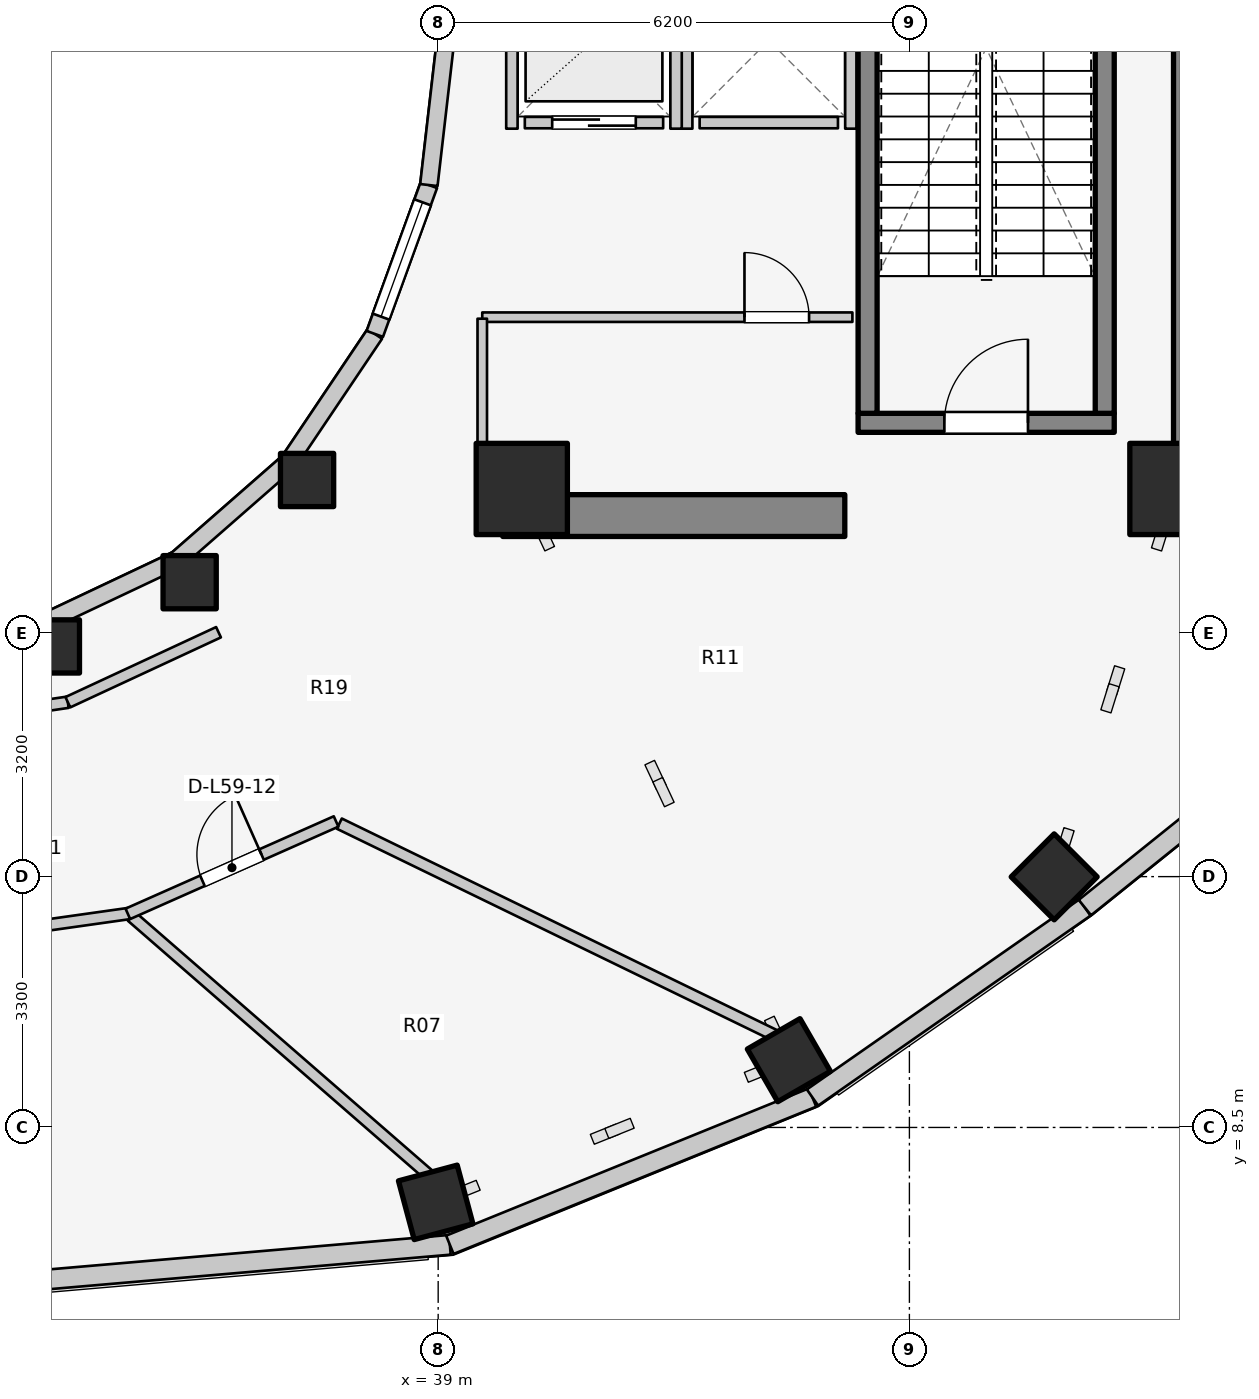
"""IFC4 building model, lengths in metres.
Left out: names, types, materials, properties, quantities, classifications, styles, units other than length and angle.
Written with IfcOpenShell. Run it as: python <this file> out.ifc"""

import sys

from ifc_helpers import new_model, si_unit, direction, frame, frame_2d, origin, origin_2d, place, context, subcontext, project, spatial, rectangle, extrude, element, fill, save


model = new_model("IFC4")
c1 = context("Model", 3, precision=1e-05, world=origin(), true_north=direction((0.0, 1.0)))
c2 = subcontext(c1, "Body", "Model", "MODEL_VIEW")
j1 = project(units=[si_unit("LENGTHUNIT", "METRE"), si_unit("PLANEANGLEUNIT", "RADIAN")], contexts=[c1])
p1 = place(None, origin())
s1 = spatial("IfcSite", under=j1, at=p1, CompositionType="ELEMENT")
p2 = place(p1, origin())
s2 = spatial("IfcBuilding", under=s1, at=p2, CompositionType="ELEMENT")
p3 = place(p2, frame((0.0, 0.0, 193.2)))
s3 = spatial("IfcBuildingStorey", under=s2, at=p3, CompositionType="ELEMENT", Elevation=193.2)
p4 = place(p3, frame((48.95, 17.05, 0.0), z_axis=(0.0, 0.0, 1.0), x_axis=(0.0, 1.0, 0.0)))
e1 = element("IfcWall", 1, at=p4, inside=s3, PredefinedType="SHEAR", context=c2, shape_type="SweptSolid", body=[
    extrude(rectangle(XDim=12.8, YDim=0.55, at=frame_2d((6.4, 0.0))), origin(), (0.0, 0.0, 1.0), 4.2),
])
p5 = place(p3, frame((39.85, 16.55, 0.0), z_axis=(0.0, 0.0, 1.0), x_axis=(1.0, 0.0, 0.0)))
e2 = element("IfcWall", 2, at=p5, inside=s3, PredefinedType="SHEAR", context=c2, shape_type="SweptSolid", body=[
    extrude(rectangle(XDim=4.5, YDim=0.55, at=frame_2d((2.25, 0.0))), origin(), (0.0, 0.0, 1.0), 4.2),
])
p6 = place(p3, frame((44.525, 17.77, 0.0), z_axis=(0.0, 0.0, 1.0), x_axis=(1.0, 0.0, 0.0)))
e3 = element("IfcWall", 3, at=p6, inside=s3, PredefinedType="SOLIDWALL", context=c2, shape_type="SweptSolid", body=[
    extrude(rectangle(XDim=3.37, YDim=0.25, at=frame_2d((1.685, 0.0))), origin(), (0.0, 0.0, 1.0), 4.2),
])
p7 = place(p6, frame((1.135, 0.0, 0.0)))
e4 = element("IfcOpeningElement", 4, at=p7, cuts=e3, PredefinedType="OPENING", context=c2, shape_type="SweptSolid", body=[
    extrude(rectangle(XDim=1.1, YDim=2.1, at=frame_2d((0.55, 1.05))), frame((0.0, 0.135, 0.0), z_axis=(0.0, -1.0, 0.0), x_axis=(1.0, 0.0, 0.0)), (0.0, 0.0, 1.0), 0.27),
])
for number, where, z_axis, x_axis in (
    (5, (44.65, 17.895, 0.0), (0.0, 0.0, 1.0), (0.0, 1.0, 0.0)),
    (6, (47.77, 17.895, 0.0), (0.0, 0.0, 1.0), (0.0, 1.0, 0.0)),
):
    element("IfcWall", number, at=place(p3, frame(where, z_axis=z_axis, x_axis=x_axis)), inside=s3, PredefinedType="SOLIDWALL", context=c2, shape_type="SweptSolid", body=[
        extrude(rectangle(XDim=7.81, YDim=0.25, at=frame_2d((3.905, 0.0))), origin(), (0.0, 0.0, 1.0), 4.2),
    ])
for number, where, z_axis, x_axis in (
    (7, (40.1, 16.9, 0.0), (0.0, 0.0, 1.0), (1.0, 0.0, 0.0)),
    (8, (48.7, 16.9, 0.0), (0.0, 0.0, 1.0), (1.0, 0.0, 0.0)),
):
    element("IfcColumn", number, at=place(p3, frame(where, z_axis=z_axis, x_axis=x_axis)), inside=s3, PredefinedType="COLUMN", context=c2, shape_type="SweptSolid", body=[
        extrude(rectangle(XDim=1.2, YDim=1.2, at=origin_2d()), origin(), (0.0, 0.0, 1.0), 4.2),
    ])
p8 = place(p3, frame((33.931, 14.828, 0.0), z_axis=(0.0, 0.0, 1.0), x_axis=(1.0, 0.0, 0.0)))
e9 = element("IfcColumn", 9, at=p8, inside=s3, PredefinedType="COLUMN", context=c2, shape_type="SweptSolid", body=[
    extrude(rectangle(XDim=0.7, YDim=0.7, at=origin_2d()), origin(), (0.0, 0.0, 1.0), 4.2),
])
p9 = place(p3, frame((38.967, 7.515, 0.0), z_axis=(0.0, 0.0, 1.0), x_axis=(0.258819045103, -0.965925826289, 0.0)))
e10 = element("IfcColumn", 10, at=p9, inside=s3, PredefinedType="COLUMN", context=c2, shape_type="SweptSolid", body=[
    extrude(rectangle(XDim=0.8, YDim=0.8, at=origin_2d()), origin(), (0.0, 0.0, 1.0), 4.2),
])
p10 = place(p3, frame((35.73, 15.673, 0.0), z_axis=(0.0, 0.0, 1.0), x_axis=(1.0, 0.0, 0.0)))
e11 = element("IfcColumn", 11, at=p10, inside=s3, PredefinedType="COLUMN", context=c2, shape_type="SweptSolid", body=[
    extrude(rectangle(XDim=0.7, YDim=0.7, at=origin_2d()), origin(), (0.0, 0.0, 1.0), 4.2),
])
p11 = place(p3, frame((43.614, 9.385, 0.0), z_axis=(0.0, 0.0, 1.0), x_axis=(0.5, -0.866025403784, 0.0)))
e12 = element("IfcColumn", 12, at=p11, inside=s3, PredefinedType="COLUMN", context=c2, shape_type="SweptSolid", body=[
    extrude(rectangle(XDim=0.8, YDim=0.8, at=origin_2d()), origin(), (0.0, 0.0, 1.0), 4.2),
])
p12 = place(p3, frame((37.275, 17.018, 0.0), z_axis=(0.0, 0.0, 1.0), x_axis=(1.0, 0.0, 0.0)))
e13 = element("IfcColumn", 13, at=p12, inside=s3, PredefinedType="COLUMN", context=c2, shape_type="SweptSolid", body=[
    extrude(rectangle(XDim=0.7, YDim=0.7, at=origin_2d()), origin(), (0.0, 0.0, 1.0), 4.2),
])
p13 = place(p3, frame((47.105, 11.797, 0.0), z_axis=(0.0, 0.0, 1.0), x_axis=(0.707106781187, -0.707106781187, 0.0)))
e14 = element("IfcColumn", 14, at=p13, inside=s3, PredefinedType="COLUMN", context=c2, shape_type="SweptSolid", body=[
    extrude(rectangle(XDim=0.8, YDim=0.8, at=origin_2d()), origin(), (0.0, 0.0, 1.0), 4.2),
])
p14 = place(p3, frame((33.843, 15.157, 0.0), z_axis=(0.0, 0.0, 1.0), x_axis=(0.904179699603, 0.427152280606, 0.0)))
e15 = element("IfcWall", 15, at=p14, inside=s3, PredefinedType="STANDARD", context=c2, shape_type="SweptSolid", body=[
    extrude(rectangle(XDim=1.899, YDim=0.23, at=frame_2d((0.95, 0.0))), origin(), (0.0, 0.0, 1.0), 2.32),
])
p15 = place(p3, frame((35.56, 15.968, 0.0), z_axis=(0.0, 0.0, 1.0), x_axis=(0.752576694707, 0.658504607869, 0.0)))
e16 = element("IfcWall", 16, at=p15, inside=s3, PredefinedType="STANDARD", context=c2, shape_type="SweptSolid", body=[
    extrude(rectangle(XDim=1.959, YDim=0.23, at=frame_2d((0.98, 0.0))), origin(), (0.0, 0.0, 1.0), 2.32),
])
p16 = place(p3, frame((37.035, 17.258, 0.0), z_axis=(0.0, 0.0, 1.0), x_axis=(0.558197800898, 0.829707909492, 0.0)))
e17 = element("IfcWall", 17, at=p16, inside=s3, PredefinedType="STANDARD", context=c2, shape_type="SweptSolid", body=[
    extrude(rectangle(XDim=2.027, YDim=0.23, at=frame_2d((1.013, 0.0))), origin(), (0.0, 0.0, 1.0), 2.32),
])
p17 = place(p3, frame((38.166, 18.94, 0.0), z_axis=(0.0, 0.0, 1.0), x_axis=(0.341423187295, 0.93990968033, 0.0)))
e18 = element("IfcWall", 18, at=p17, inside=s3, PredefinedType="STANDARD", context=c2, shape_type="SweptSolid", body=[
    extrude(rectangle(XDim=2.084, YDim=0.23, at=frame_2d((1.042, 0.0))), origin(), (0.0, 0.0, 1.0), 2.8),
])
p18 = place(p17, frame((0.242, 0.0, 0.85)))
e19 = element("IfcOpeningElement", 19, at=p18, cuts=e18, PredefinedType="OPENING", context=c2, shape_type="SweptSolid", body=[
    extrude(rectangle(XDim=1.6, YDim=1.65, at=frame_2d((0.8, 0.825))), frame((0.0, 0.125, 0.0), z_axis=(0.0, -1.0, 0.0), x_axis=(1.0, 0.0, 0.0)), (0.0, 0.0, 1.0), 0.25),
])
p19 = place(p3, frame((38.877, 20.898, 0.0), z_axis=(0.0, 0.0, 1.0), x_axis=(0.114711713601, 0.993398823617, 0.0)))
e20 = element("IfcWall", 20, at=p19, inside=s3, PredefinedType="STANDARD", context=c2, shape_type="SweptSolid", body=[
    extrude(rectangle(XDim=2.115, YDim=0.23, at=frame_2d((1.058, 0.0))), origin(), (0.0, 0.0, 1.0), 2.8),
])
p20 = place(p3, frame((32.0, 6.34, 0.0), z_axis=(0.0, 0.0, 1.0), x_axis=(0.996313592678, 0.085785925682, 0.0)))
e21 = element("IfcWall", 21, at=p20, inside=s3, PredefinedType="STANDARD", context=c2, shape_type="SweptSolid", body=[
    extrude(rectangle(XDim=7.18, YDim=0.26, at=frame_2d((3.59, 0.0))), origin(), (0.0, 0.0, 1.0), 2.32),
])
p21 = place(p3, frame((39.154, 6.956, 0.0), z_axis=(0.0, 0.0, 1.0), x_axis=(0.926505317676, 0.376281671514, 0.0)))
e22 = element("IfcWall", 22, at=p21, inside=s3, PredefinedType="STANDARD", context=c2, shape_type="SweptSolid", body=[
    extrude(rectangle(XDim=5.15, YDim=0.26, at=frame_2d((2.575, 0.0))), origin(), (0.0, 0.0, 1.0), 2.32),
])
p22 = place(p3, frame((43.925, 8.894, 0.0), z_axis=(0.0, 0.0, 1.0), x_axis=(0.820288529478, 0.571949935228, 0.0)))
e23 = element("IfcWall", 23, at=p22, inside=s3, PredefinedType="STANDARD", context=c2, shape_type="SweptSolid", body=[
    extrude(rectangle(XDim=4.369, YDim=0.26, at=frame_2d((2.185, 0.0))), origin(), (0.0, 0.0, 1.0), 2.32),
])
p23 = place(p3, frame((47.509, 11.393, 0.0), z_axis=(0.0, 0.0, 1.0), x_axis=(0.779582489695, 0.626299562319, 0.0)))
e24 = element("IfcWall", 24, at=p23, inside=s3, PredefinedType="STANDARD", context=c2, shape_type="SweptSolid", body=[
    extrude(rectangle(XDim=4.283, YDim=0.26, at=frame_2d((2.142, 0.0))), origin(), (0.0, 0.0, 1.0), 2.32),
])
p24 = place(p3, frame((42.44, 21.72, 0.0), z_axis=(0.0, 0.0, 1.0), x_axis=(1.0, 0.0, 0.0)))
e25 = element("IfcWall", 25, at=p24, inside=s3, PredefinedType="SOLIDWALL", context=c2, shape_type="SweptSolid", body=[
    extrude(rectangle(XDim=1.82, YDim=0.15, at=frame_2d((0.91, 0.0))), origin(), (0.0, 0.0, 1.0), 3.675),
])
for number, where, z_axis, x_axis in (
    (26, (42.27, 21.64, 0.0), (0.0, 0.0, 1.0), (0.0, 1.0, 0.0)),
    (27, (44.43, 21.64, 0.0), (0.0, 0.0, 1.0), (0.0, 1.0, 0.0)),
):
    element("IfcWall", number, at=place(p3, frame(where, z_axis=z_axis, x_axis=x_axis)), inside=s3, PredefinedType="SOLIDWALL", context=c2, shape_type="SweptSolid", body=[
        extrude(rectangle(XDim=2.32, YDim=0.15, at=frame_2d((1.16, 0.0))), origin(), (0.0, 0.0, 1.0), 3.675),
    ])
p25 = place(p3, frame((40.14, 21.72, 0.0), z_axis=(0.0, 0.0, 1.0), x_axis=(1.0, 0.0, 0.0)))
e28 = element("IfcWall", 28, at=p25, inside=s3, PredefinedType="SOLIDWALL", context=c2, shape_type="SweptSolid", body=[
    extrude(rectangle(XDim=1.82, YDim=0.15, at=frame_2d((0.91, 0.0))), origin(), (0.0, 0.0, 1.0), 3.22),
])
p26 = place(p25, frame((0.36, 0.0, 0.0)))
e29 = element("IfcOpeningElement", 29, at=p26, cuts=e28, PredefinedType="OPENING", context=c2, shape_type="SweptSolid", body=[
    extrude(rectangle(XDim=1.1, YDim=2.1, at=frame_2d((0.55, 1.05))), frame((0.0, 0.085, 0.0), z_axis=(0.0, -1.0, 0.0), x_axis=(1.0, 0.0, 0.0)), (0.0, 0.0, 1.0), 0.17),
])
p27 = place(p3, frame((39.97, 21.64, 0.0), z_axis=(0.0, 0.0, 1.0), x_axis=(0.0, 1.0, 0.0)))
e30 = element("IfcWall", 30, at=p27, inside=s3, PredefinedType="SOLIDWALL", context=c2, shape_type="SweptSolid", body=[
    extrude(rectangle(XDim=2.32, YDim=0.15, at=frame_2d((1.16, 0.0))), origin(), (0.0, 0.0, 1.0), 3.22),
])
p28 = place(p3, frame((42.13, 21.64, 0.0), z_axis=(0.0, 0.0, 1.0), x_axis=(0.0, 1.0, 0.0)))
e31 = element("IfcWall", 31, at=p28, inside=s3, PredefinedType="SOLIDWALL", context=c2, shape_type="SweptSolid", body=[
    extrude(rectangle(XDim=2.32, YDim=0.15, at=frame_2d((1.16, 0.0))), origin(), (0.0, 0.0, 1.0), 3.675),
])
p29 = place(p3, frame((39.58, 19.16, 0.0), z_axis=(0.0, 0.0, 1.0), x_axis=(1.0, 0.0, 0.0)))
e32 = element("IfcWall", 32, at=p29, inside=s3, PredefinedType="PARTITIONING", context=c2, shape_type="SweptSolid", body=[
    extrude(rectangle(XDim=4.87, YDim=0.125, at=frame_2d((2.435, 0.0))), origin(), (0.0, 0.0, 1.0), 3.22),
])
p30 = place(p29, frame((3.45, 0.0, 0.0)))
e33 = element("IfcOpeningElement", 33, at=p30, cuts=e32, PredefinedType="OPENING", context=c2, shape_type="SweptSolid", body=[
    extrude(rectangle(XDim=0.85, YDim=2.05, at=frame_2d((0.425, 1.025))), frame((0.0, 0.073, 0.0), z_axis=(0.0, -1.0, 0.0), x_axis=(1.0, 0.0, 0.0)), (0.0, 0.0, 1.0), 0.145),
])
p31 = place(p3, frame((39.58, 17.1, 0.0), z_axis=(0.0, 0.0, 1.0), x_axis=(0.0, 1.0, 0.0)))
e34 = element("IfcWall", 34, at=p31, inside=s3, PredefinedType="PARTITIONING", context=c2, shape_type="SweptSolid", body=[
    extrude(rectangle(XDim=2.04, YDim=0.125, at=frame_2d((1.02, 0.0))), origin(), (0.0, 0.0, 1.0), 3.052),
])
p32 = place(p3, frame((32.0, 13.78, 0.0), z_axis=(0.0, 0.0, 1.0), x_axis=(0.989268584896, 0.146108408166, 0.0)))
e35 = element("IfcWall", 35, at=p32, inside=s3, PredefinedType="PARTITIONING", context=c2, shape_type="SweptSolid", body=[
    extrude(rectangle(XDim=2.151, YDim=0.15, at=frame_2d((1.075, 0.0))), origin(), (0.0, 0.0, 1.0), 3.196),
])
p33 = place(p3, frame((34.127, 14.094, 0.0), z_axis=(0.0, 0.0, 1.0), x_axis=(0.906943449489, 0.421252393975, 0.0)))
e36 = element("IfcWall", 36, at=p33, inside=s3, PredefinedType="PARTITIONING", context=c2, shape_type="SweptSolid", body=[
    extrude(rectangle(XDim=2.186, YDim=0.15, at=frame_2d((1.093, 0.0))), origin(), (0.0, 0.0, 1.0), 2.32),
])
p34 = place(p3, frame((34.966, 11.276, 0.0), z_axis=(0.0, 0.0, 1.0), x_axis=(0.754512026555, -0.656286219407, 0.0)))
e37 = element("IfcWall", 37, at=p34, inside=s3, PredefinedType="PARTITIONING", context=c2, shape_type="SweptSolid", body=[
    extrude(rectangle(XDim=5.172, YDim=0.15, at=frame_2d((2.586, 0.0))), origin(), (0.0, 0.0, 1.0), 2.32),
])
p35 = place(p3, frame((37.699, 12.497, 0.0), z_axis=(0.0, 0.0, 1.0), x_axis=(0.899365131214, -0.437198308273, 0.0)))
e38 = element("IfcWall", 38, at=p35, inside=s3, PredefinedType="PARTITIONING", context=c2, shape_type="SweptSolid", body=[
    extrude(rectangle(XDim=6.365, YDim=0.15, at=frame_2d((3.183, 0.0))), origin(), (0.0, 0.0, 1.0), 2.32),
])
p36 = place(p3, frame((31.998, 10.9, 0.0), z_axis=(0.0, 0.0, 1.0), x_axis=(0.990167445312, 0.139887205436, 0.0)))
e39 = element("IfcWall", 39, at=p36, inside=s3, PredefinedType="PARTITIONING", context=c2, shape_type="SweptSolid", body=[
    extrude(rectangle(XDim=2.963, YDim=0.15, at=frame_2d((1.482, 0.0))), origin(), (0.0, 0.0, 1.0), 3.196),
])
p37 = place(p36, frame((1.057, 0.0, 0.0)))
e40 = element("IfcOpeningElement", 40, at=p37, cuts=e39, PredefinedType="OPENING", context=c2, shape_type="SweptSolid", body=[
    extrude(rectangle(XDim=0.85, YDim=2.05, at=frame_2d((0.425, 1.025))), frame((0.0, 0.085, 0.0), z_axis=(0.0, -1.0, 0.0), x_axis=(1.0, 0.0, 0.0)), (0.0, 0.0, 1.0), 0.17),
])
p38 = place(p3, frame((34.917, 11.31, 0.0), z_axis=(0.0, 0.0, 1.0), x_axis=(0.914100192658, 0.405488394141, 0.0)))
e41 = element("IfcWall", 41, at=p38, inside=s3, PredefinedType="PARTITIONING", context=c2, shape_type="SweptSolid", body=[
    extrude(rectangle(XDim=2.997, YDim=0.15, at=frame_2d((1.499, 0.0))), origin(), (0.0, 0.0, 1.0), 3.196),
])
p39 = place(p38, frame((1.073, 0.0, 0.0)))
e42 = element("IfcOpeningElement", 42, at=p39, cuts=e41, PredefinedType="OPENING", context=c2, shape_type="SweptSolid", body=[
    extrude(rectangle(XDim=0.85, YDim=2.05, at=frame_2d((0.425, 1.025))), frame((0.0, 0.085, 0.0), z_axis=(0.0, -1.0, 0.0), x_axis=(1.0, 0.0, 0.0)), (0.0, 0.0, 1.0), 0.17),
])
p40 = place(p18, origin())
e43 = element("IfcWindow", 43, at=p40, inside=s3, PartitioningType="SINGLE_PANEL", PredefinedType="WINDOW", context=c2, shape_type="SweptSolid", body=[
    extrude(rectangle(XDim=1.6, YDim=1.65, at=frame_2d((0.8, 0.825))), frame((0.0, 0.03, 0.0), z_axis=(0.0, -1.0, 0.0), x_axis=(1.0, 0.0, 0.0)), (0.0, 0.0, 1.0), 0.06),
])
fill(e19, e43)
p41 = place(p7, origin())
e44 = element("IfcDoor", 44, at=p41, inside=s3, OperationType="SINGLE_SWING_RIGHT", PredefinedType="DOOR", context=c2, shape_type="SweptSolid", body=[
    extrude(rectangle(XDim=1.1, YDim=2.1, at=frame_2d((0.55, 1.05))), frame((0.0, 0.025, 0.0), z_axis=(0.0, -1.0, 0.0), x_axis=(1.0, 0.0, 0.0)), (0.0, 0.0, 1.0), 0.05),
])
fill(e4, e44)
p42 = place(p26, origin())
e45 = element("IfcDoor", 45, at=p42, inside=s3, OperationType="DOUBLE_DOOR_SLIDING", PredefinedType="DOOR", context=c2, shape_type="SweptSolid", body=[
    extrude(rectangle(XDim=1.1, YDim=2.1, at=frame_2d((0.55, 1.05))), frame((0.0, 0.025, 0.0), z_axis=(0.0, -1.0, 0.0), x_axis=(1.0, 0.0, 0.0)), (0.0, 0.0, 1.0), 0.05),
])
fill(e29, e45)
p43 = place(p30, origin())
e46 = element("IfcDoor", 46, at=p43, inside=s3, OperationType="SINGLE_SWING_LEFT", PredefinedType="DOOR", context=c2, shape_type="SweptSolid", body=[
    extrude(rectangle(XDim=0.85, YDim=2.05, at=frame_2d((0.425, 1.025))), frame((0.0, 0.025, 0.0), z_axis=(0.0, -1.0, 0.0), x_axis=(1.0, 0.0, 0.0)), (0.0, 0.0, 1.0), 0.05),
])
fill(e33, e46)
p44 = place(p39, origin())
e47 = element("IfcDoor", 47, at=p44, inside=s3, OperationType="SINGLE_SWING_RIGHT", PredefinedType="DOOR", context=c2, shape_type="SweptSolid", body=[
    extrude(rectangle(XDim=0.85, YDim=2.05, at=frame_2d((0.425, 1.025))), frame((0.0, 0.025, 0.0), z_axis=(0.0, -1.0, 0.0), x_axis=(1.0, 0.0, 0.0)), (0.0, 0.0, 1.0), 0.05),
])
fill(e42, e47)
save(model, sys.argv[1])
